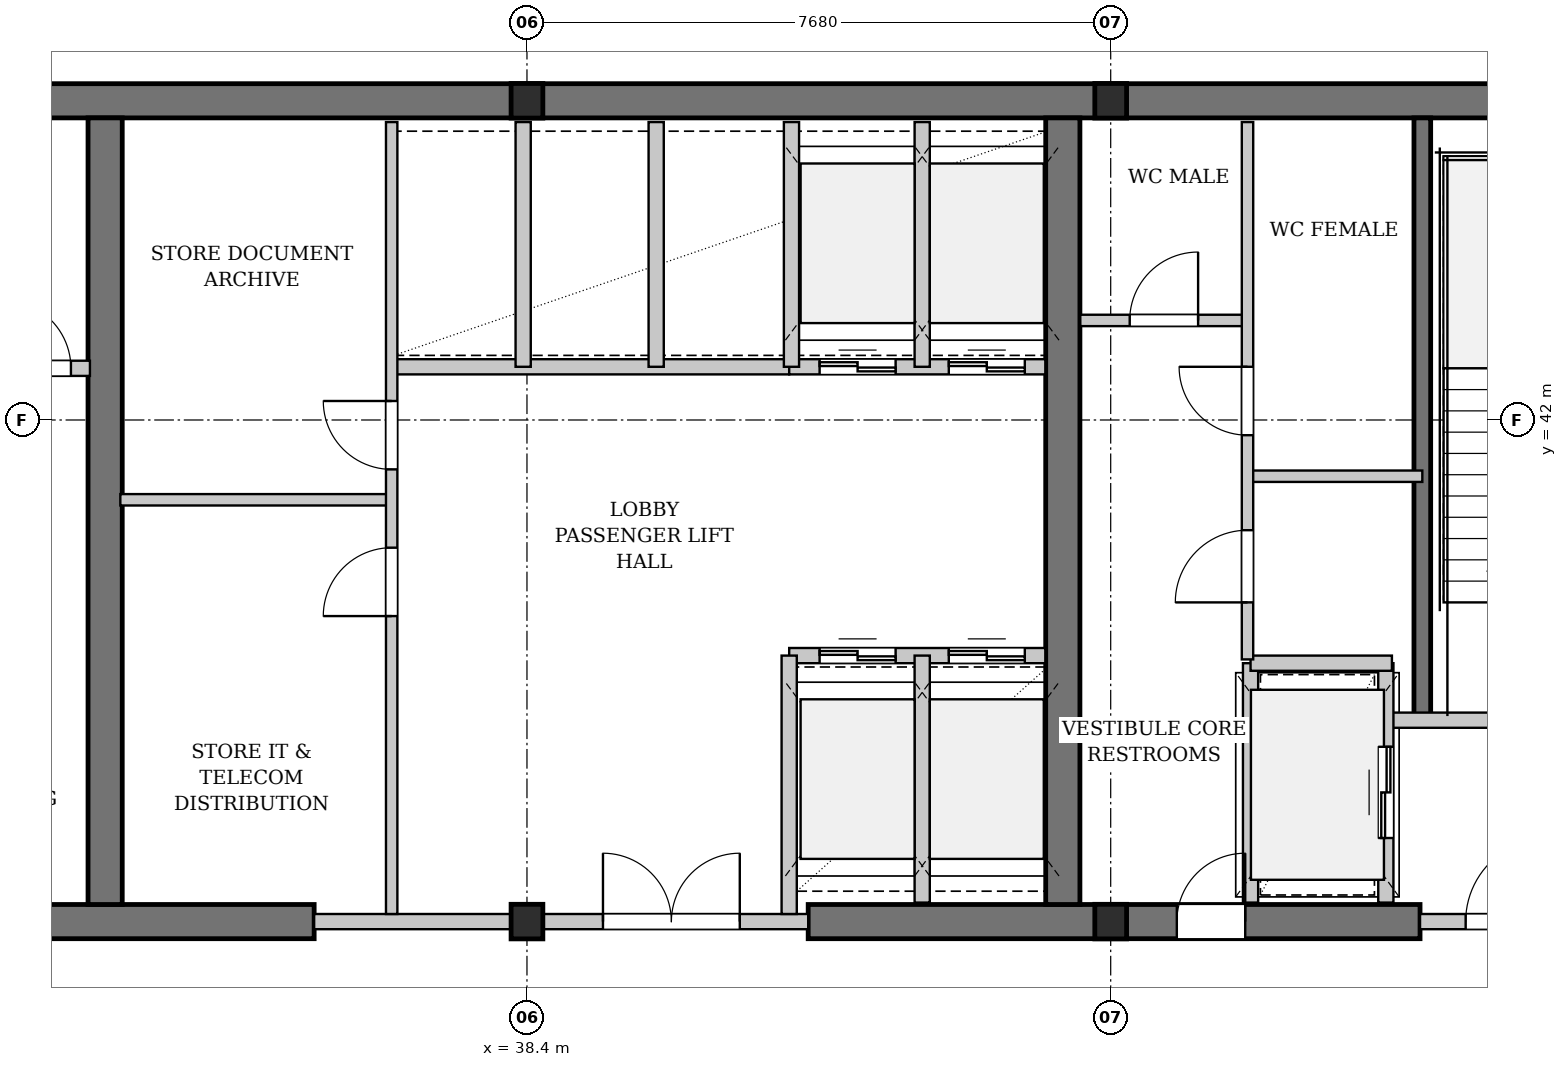
"""IFC4 building model, lengths in metres.
Left out: names, types, materials, properties, quantities, classifications, styles, units other than length and angle.
Written with IfcOpenShell. Run it as: python <this file> out.ifc"""

import sys

from ifc_helpers import new_model, si_unit, direction, frame, frame_2d, origin, origin_2d, place, context, subcontext, project, spatial, rectangle, i_section, extrude, element, fill, save


model = new_model("IFC4")
c1 = context("Model", 3, precision=1e-05, world=origin(), true_north=direction((0.0, 1.0)))
c2 = subcontext(c1, "Body", "Model", "MODEL_VIEW")
j1 = project(units=[si_unit("LENGTHUNIT", "METRE"), si_unit("PLANEANGLEUNIT", "RADIAN")], contexts=[c1])
p1 = place(None, origin())
s1 = spatial("IfcSite", under=j1, at=p1, CompositionType="ELEMENT")
p2 = place(p1, origin())
s2 = spatial("IfcBuilding", under=s1, at=p2, CompositionType="ELEMENT")
p3 = place(p2, frame((0.0, 0.0, 191.9)))
s3 = spatial("IfcBuildingStorey", under=s2, at=p3, CompositionType="ELEMENT", Elevation=191.9)
p4 = place(p3, frame((22.815, 46.2, 0.0), z_axis=(0.0, 0.0, 1.0), x_axis=(1.0, 0.0, 0.0)))
e1 = element("IfcWall", 1, at=p4, inside=s3, PredefinedType="SHEAR", context=c2, shape_type="SweptSolid", body=[
    extrude(rectangle(XDim=31.17, YDim=0.45, at=frame_2d((15.585, 0.0))), origin(), (0.0, 0.0, 1.0), 3.98),
])
p5 = place(p3, frame((30.72, 35.4, 0.0), z_axis=(0.0, 0.0, 1.0), x_axis=(1.0, 0.0, 0.0)))
e2 = element("IfcWall", 2, at=p5, inside=s3, PredefinedType="SHEAR", context=c2, shape_type="SweptSolid", body=[
    extrude(rectangle(XDim=4.88, YDim=0.45, at=frame_2d((2.44, 0.0))), origin(), (0.0, 0.0, 1.0), 3.98),
])
p6 = place(p3, frame((42.1, 35.4, 0.0), z_axis=(0.0, 0.0, 1.0), x_axis=(1.0, 0.0, 0.0)))
e3 = element("IfcWall", 3, at=p6, inside=s3, PredefinedType="SHEAR", context=c2, shape_type="SweptSolid", body=[
    extrude(rectangle(XDim=8.05, YDim=0.45, at=frame_2d((4.025, 0.0))), origin(), (0.0, 0.0, 1.0), 3.98),
])
p7 = place(p6, frame((4.85, 0.0, 0.0)))
e4 = element("IfcOpeningElement", 4, at=p7, cuts=e3, PredefinedType="OPENING", context=c2, shape_type="SweptSolid", body=[
    extrude(rectangle(XDim=0.9, YDim=2.15, at=frame_2d((0.45, 1.075))), frame((0.0, 0.235, 0.0), z_axis=(0.0, -1.0, 0.0), x_axis=(1.0, 0.0, 0.0)), (0.0, 0.0, 1.0), 0.47),
])
for number, where, z_axis, x_axis in (
    (5, (32.85, 35.625, 0.0), (0.0, 0.0, 1.0), (0.0, 1.0, 0.0)),
    (6, (45.45, 35.625, 0.0), (0.0, 0.0, 1.0), (0.0, 1.0, 0.0)),
):
    element("IfcWall", number, at=place(p3, frame(where, z_axis=z_axis, x_axis=x_axis)), inside=s3, PredefinedType="SHEAR", context=c2, shape_type="SweptSolid", body=[
        extrude(rectangle(XDim=10.35, YDim=0.45, at=frame_2d((5.175, 0.0))), origin(), (0.0, 0.0, 1.0), 3.98),
    ])
p8 = place(p3, frame((50.18, 38.05, 0.0), z_axis=(0.0, 0.0, 1.0), x_axis=(0.0, 1.0, 0.0)))
e7 = element("IfcWall", 7, at=p8, inside=s3, PredefinedType="SHEAR", context=c2, shape_type="SweptSolid", body=[
    extrude(rectangle(XDim=7.925, YDim=0.22, at=frame_2d((3.962, 0.0))), origin(), (0.0, 0.0, 1.0), 3.98),
])
for number, where, z_axis, x_axis in (
    (8, (38.4, 35.4, 0.0), (0.0, 0.0, 1.0), (1.0, 0.0, 0.0)),
    (9, (38.4, 46.2, 0.0), (0.0, 0.0, 1.0), (1.0, 0.0, 0.0)),
    (10, (46.08, 35.4, 0.0), (0.0, 0.0, 1.0), (1.0, 0.0, 0.0)),
    (11, (46.08, 46.2, 0.0), (0.0, 0.0, 1.0), (1.0, 0.0, 0.0)),
):
    element("IfcColumn", number, at=place(p3, frame(where, z_axis=z_axis, x_axis=x_axis)), inside=s3, PredefinedType="COLUMN", context=c2, shape_type="SweptSolid", body=[
        extrude(i_section(OverallWidth=0.418, OverallDepth=0.455, WebThickness=0.042, FlangeThickness=0.068, FilletRadius=0.015, at=origin_2d()), origin(), (0.0, 0.0, 1.0), 4.2),
    ])
p9 = place(p3, frame((27.32, 42.68, 0.0), z_axis=(0.0, 0.0, 1.0), x_axis=(1.0, 0.0, 0.0)))
e12 = element("IfcWall", 12, at=p9, inside=s3, PredefinedType="PARTITIONING", context=c2, shape_type="SweptSolid", body=[
    extrude(rectangle(XDim=5.33, YDim=0.2, at=frame_2d((2.665, 0.0))), origin(), (0.0, 0.0, 1.0), 3.98),
])
p10 = place(p9, frame((4.18, 0.0, 0.0)))
e13 = element("IfcOpeningElement", 13, at=p10, cuts=e12, PredefinedType="OPENING", context=c2, shape_type="SweptSolid", body=[
    extrude(rectangle(XDim=0.9, YDim=2.15, at=frame_2d((0.45, 1.075))), frame((0.0, 0.11, 0.0), z_axis=(0.0, -1.0, 0.0), x_axis=(1.0, 0.0, 0.0)), (0.0, 0.0, 1.0), 0.22),
])
p11 = place(p3, frame((35.6, 35.4, 0.0), z_axis=(0.0, 0.0, 1.0), x_axis=(1.0, 0.0, 0.0)))
e14 = element("IfcWall", 14, at=p11, inside=s3, PredefinedType="PARTITIONING", context=c2, shape_type="SweptSolid", body=[
    extrude(rectangle(XDim=6.5, YDim=0.2, at=frame_2d((3.25, 0.0))), origin(), (0.0, 0.0, 1.0), 3.161),
])
p12 = place(p11, frame((3.8, 0.0, 0.0)))
e15 = element("IfcOpeningElement", 15, at=p12, cuts=e14, PredefinedType="OPENING", context=c2, shape_type="SweptSolid", body=[
    extrude(rectangle(XDim=1.8, YDim=2.3, at=frame_2d((0.9, 1.15))), frame((0.0, 0.11, 0.0), z_axis=(0.0, -1.0, 0.0), x_axis=(1.0, 0.0, 0.0)), (0.0, 0.0, 1.0), 0.22),
])
p13 = place(p3, frame((36.6, 42.7, 0.0), z_axis=(0.0, 0.0, 1.0), x_axis=(1.0, 0.0, 0.0)))
e16 = element("IfcWall", 16, at=p13, inside=s3, PredefinedType="PARTITIONING", context=c2, shape_type="SweptSolid", body=[
    extrude(rectangle(XDim=5.25, YDim=0.2, at=frame_2d((2.625, 0.0))), origin(), (0.0, 0.0, 1.0), 3.98),
])
p14 = place(p3, frame((38.35, 42.7, 0.0), z_axis=(0.0, 0.0, 1.0), x_axis=(0.0, 1.0, 0.0)))
e17 = element("IfcWall", 17, at=p14, inside=s3, PredefinedType="PARTITIONING", context=c2, shape_type="SweptSolid", body=[
    extrude(rectangle(XDim=3.22, YDim=0.2, at=frame_2d((1.61, 0.0))), origin(), (0.0, 0.0, 1.0), 3.161),
])
p15 = place(p3, frame((40.1, 42.7, 0.0), z_axis=(0.0, 0.0, 1.0), x_axis=(0.0, 1.0, 0.0)))
e18 = element("IfcWall", 18, at=p15, inside=s3, PredefinedType="PARTITIONING", context=c2, shape_type="SweptSolid", body=[
    extrude(rectangle(XDim=3.22, YDim=0.2, at=frame_2d((1.61, 0.0))), origin(), (0.0, 0.0, 1.0), 3.98),
])
p16 = place(p3, frame((33.05, 40.95, 0.0), z_axis=(0.0, 0.0, 1.0), x_axis=(1.0, 0.0, 0.0)))
e19 = element("IfcWall", 19, at=p16, inside=s3, PredefinedType="PARTITIONING", context=c2, shape_type="SweptSolid", body=[
    extrude(rectangle(XDim=3.57, YDim=0.15, at=frame_2d((1.785, 0.0))), origin(), (0.0, 0.0, 1.0), 3.98),
])
p17 = place(p3, frame((36.62, 35.5, 0.0), z_axis=(0.0, 0.0, 1.0), x_axis=(0.0, 1.0, 0.0)))
e20 = element("IfcWall", 20, at=p17, inside=s3, PredefinedType="PARTITIONING", context=c2, shape_type="SweptSolid", body=[
    extrude(rectangle(XDim=10.42, YDim=0.15, at=frame_2d((5.21, 0.0))), origin(), (0.0, 0.0, 1.0), 3.98),
])
p18 = place(p17, frame((3.92, 0.0, 0.0)))
e21 = element("IfcOpeningElement", 21, at=p18, cuts=e20, PredefinedType="OPENING", context=c2, shape_type="SweptSolid", body=[
    extrude(rectangle(XDim=0.9, YDim=2.15, at=frame_2d((0.45, 1.075))), frame((0.0, 0.085, 0.0), z_axis=(0.0, -1.0, 0.0), x_axis=(1.0, 0.0, 0.0)), (0.0, 0.0, 1.0), 0.17),
])
p19 = place(p17, frame((5.85, 0.0, 0.0)))
e22 = element("IfcOpeningElement", 22, at=p19, cuts=e20, PredefinedType="OPENING", context=c2, shape_type="SweptSolid", body=[
    extrude(rectangle(XDim=0.9, YDim=2.15, at=frame_2d((0.45, 1.075))), frame((0.0, 0.085, 0.0), z_axis=(0.0, -1.0, 0.0), x_axis=(1.0, 0.0, 0.0)), (0.0, 0.0, 1.0), 0.17),
])
p20 = place(p3, frame((41.85, 38.9, 0.0), z_axis=(0.0, 0.0, 1.0), x_axis=(1.0, 0.0, 0.0)))
e23 = element("IfcWall", 23, at=p20, inside=s3, PredefinedType="PARTITIONING", context=c2, shape_type="SweptSolid", body=[
    extrude(rectangle(XDim=3.37, YDim=0.2, at=frame_2d((1.685, 0.0))), origin(), (0.0, 0.0, 1.0), 3.98),
])
p21 = place(p20, frame((0.4, 0.0, 0.0)))
e24 = element("IfcOpeningElement", 24, at=p21, cuts=e23, PredefinedType="OPENING", context=c2, shape_type="SweptSolid", body=[
    extrude(rectangle(XDim=1.0, YDim=2.2, at=frame_2d((0.5, 1.1))), frame((0.0, 0.11, 0.0), z_axis=(0.0, -1.0, 0.0), x_axis=(1.0, 0.0, 0.0)), (0.0, 0.0, 1.0), 0.22),
])
p22 = place(p20, frame((2.1, 0.0, 0.0)))
e25 = element("IfcOpeningElement", 25, at=p22, cuts=e23, PredefinedType="OPENING", context=c2, shape_type="SweptSolid", body=[
    extrude(rectangle(XDim=1.0, YDim=2.2, at=frame_2d((0.5, 1.1))), frame((0.0, 0.11, 0.0), z_axis=(0.0, -1.0, 0.0), x_axis=(1.0, 0.0, 0.0)), (0.0, 0.0, 1.0), 0.22),
])
p23 = place(p3, frame((41.85, 42.7, 0.0), z_axis=(0.0, 0.0, 1.0), x_axis=(1.0, 0.0, 0.0)))
e26 = element("IfcWall", 26, at=p23, inside=s3, PredefinedType="PARTITIONING", context=c2, shape_type="SweptSolid", body=[
    extrude(rectangle(XDim=3.37, YDim=0.2, at=frame_2d((1.685, 0.0))), origin(), (0.0, 0.0, 1.0), 3.98),
])
p24 = place(p23, frame((0.4, 0.0, 0.0)))
e27 = element("IfcOpeningElement", 27, at=p24, cuts=e26, PredefinedType="OPENING", context=c2, shape_type="SweptSolid", body=[
    extrude(rectangle(XDim=1.0, YDim=2.2, at=frame_2d((0.5, 1.1))), frame((0.0, 0.11, 0.0), z_axis=(0.0, -1.0, 0.0), x_axis=(1.0, 0.0, 0.0)), (0.0, 0.0, 1.0), 0.22),
])
p25 = place(p23, frame((2.1, 0.0, 0.0)))
e28 = element("IfcOpeningElement", 28, at=p25, cuts=e26, PredefinedType="OPENING", context=c2, shape_type="SweptSolid", body=[
    extrude(rectangle(XDim=1.0, YDim=2.2, at=frame_2d((0.5, 1.1))), frame((0.0, 0.11, 0.0), z_axis=(0.0, -1.0, 0.0), x_axis=(1.0, 0.0, 0.0)), (0.0, 0.0, 1.0), 0.22),
])
p26 = place(p3, frame((43.6, 35.65, 0.0), z_axis=(0.0, 0.0, 1.0), x_axis=(0.0, 1.0, 0.0)))
e29 = element("IfcWall", 29, at=p26, inside=s3, PredefinedType="PARTITIONING", context=c2, shape_type="SweptSolid", body=[
    extrude(rectangle(XDim=3.25, YDim=0.2, at=frame_2d((1.625, 0.0))), origin(), (0.0, 0.0, 1.0), 3.98),
])
p27 = place(p3, frame((43.6, 42.7, 0.0), z_axis=(0.0, 0.0, 1.0), x_axis=(0.0, 1.0, 0.0)))
e30 = element("IfcWall", 30, at=p27, inside=s3, PredefinedType="PARTITIONING", context=c2, shape_type="SweptSolid", body=[
    extrude(rectangle(XDim=3.22, YDim=0.2, at=frame_2d((1.61, 0.0))), origin(), (0.0, 0.0, 1.0), 3.98),
])
p28 = place(p3, frame((41.85, 35.5, 0.0), z_axis=(0.0, 0.0, 1.0), x_axis=(0.0, 1.0, 0.0)))
e31 = element("IfcWall", 31, at=p28, inside=s3, PredefinedType="PARTITIONING", context=c2, shape_type="SweptSolid", body=[
    extrude(rectangle(XDim=3.4, YDim=0.2, at=frame_2d((1.7, 0.0))), origin(), (0.0, 0.0, 1.0), 3.98),
])
p29 = place(p3, frame((41.88, 42.7, 0.0), z_axis=(0.0, 0.0, 1.0), x_axis=(0.0, 1.0, 0.0)))
e32 = element("IfcWall", 32, at=p29, inside=s3, PredefinedType="PARTITIONING", context=c2, shape_type="SweptSolid", body=[
    extrude(rectangle(XDim=3.22, YDim=0.2, at=frame_2d((1.61, 0.0))), origin(), (0.0, 0.0, 1.0), 3.98),
])
p30 = place(p3, frame((49.78, 38.05, 0.0), z_axis=(0.0, 0.0, 1.0), x_axis=(1.0, 0.0, 0.0)))
e33 = element("IfcWall", 33, at=p30, inside=s3, PredefinedType="PARTITIONING", context=c2, shape_type="SweptSolid", body=[
    extrude(rectangle(XDim=3.72, YDim=0.2, at=frame_2d((1.86, 0.0))), origin(), (0.0, 0.0, 1.0), 3.98),
])
p31 = place(p30, frame((1.436, 0.0, 0.0)))
e34 = element("IfcOpeningElement", 34, at=p31, cuts=e33, PredefinedType="OPENING", context=c2, shape_type="SweptSolid", body=[
    extrude(rectangle(XDim=1.1, YDim=2.15, at=frame_2d((0.55, 1.075))), frame((0.0, 0.11, 0.0), z_axis=(0.0, -1.0, 0.0), x_axis=(1.0, 0.0, 0.0)), (0.0, 0.0, 1.0), 0.22),
])
p32 = place(p3, frame((50.15, 35.4, 0.0), z_axis=(0.0, 0.0, 1.0), x_axis=(1.0, 0.0, 0.0)))
e35 = element("IfcWall", 35, at=p32, inside=s3, PredefinedType="PARTITIONING", context=c2, shape_type="SweptSolid", body=[
    extrude(rectangle(XDim=2.3, YDim=0.2, at=frame_2d((1.15, 0.0))), origin(), (0.0, 0.0, 1.0), 3.161),
])
p33 = place(p32, frame((0.6, 0.0, 0.0)))
e36 = element("IfcOpeningElement", 36, at=p33, cuts=e35, PredefinedType="OPENING", context=c2, shape_type="SweptSolid", body=[
    extrude(rectangle(XDim=1.1, YDim=2.15, at=frame_2d((0.55, 1.075))), frame((0.0, 0.11, 0.0), z_axis=(0.0, -1.0, 0.0), x_axis=(1.0, 0.0, 0.0)), (0.0, 0.0, 1.0), 0.22),
])
p34 = place(p3, frame((49.7, 35.65, 0.0), z_axis=(0.0, 0.0, 1.0), x_axis=(0.0, 1.0, 0.0)))
e37 = element("IfcWall", 37, at=p34, inside=s3, PredefinedType="PARTITIONING", context=c2, shape_type="SweptSolid", body=[
    extrude(rectangle(XDim=3.15, YDim=0.2, at=frame_2d((1.575, 0.0))), origin(), (0.0, 0.0, 1.0), 3.98),
])
p35 = place(p34, frame((0.85, 0.0, 0.0)))
e38 = element("IfcOpeningElement", 38, at=p35, cuts=e37, PredefinedType="OPENING", context=c2, shape_type="SweptSolid", body=[
    extrude(rectangle(XDim=1.2, YDim=2.2, at=frame_2d((0.6, 1.1))), frame((0.0, 0.11, 0.0), z_axis=(0.0, -1.0, 0.0), x_axis=(1.0, 0.0, 0.0)), (0.0, 0.0, 1.0), 0.22),
])
p36 = place(p3, frame((47.92, 35.65, 0.0), z_axis=(0.0, 0.0, 1.0), x_axis=(0.0, 1.0, 0.0)))
e39 = element("IfcWall", 39, at=p36, inside=s3, PredefinedType="PARTITIONING", context=c2, shape_type="SweptSolid", body=[
    extrude(rectangle(XDim=3.15, YDim=0.2, at=frame_2d((1.575, 0.0))), origin(), (0.0, 0.0, 1.0), 3.98),
])
p37 = place(p3, frame((47.92, 38.8, 0.0), z_axis=(0.0, 0.0, 1.0), x_axis=(1.0, 0.0, 0.0)))
e40 = element("IfcWall", 40, at=p37, inside=s3, PredefinedType="PARTITIONING", context=c2, shape_type="SweptSolid", body=[
    extrude(rectangle(XDim=1.86, YDim=0.2, at=frame_2d((0.93, 0.0))), origin(), (0.0, 0.0, 1.0), 3.98),
])
p38 = place(p3, frame((45.68, 43.31, 0.0), z_axis=(0.0, 0.0, 1.0), x_axis=(1.0, 0.0, 0.0)))
e41 = element("IfcWall", 41, at=p38, inside=s3, PredefinedType="PARTITIONING", context=c2, shape_type="SweptSolid", body=[
    extrude(rectangle(XDim=2.2, YDim=0.15, at=frame_2d((1.1, 0.0))), origin(), (0.0, 0.0, 1.0), 3.98),
])
p39 = place(p38, frame((0.65, 0.0, 0.0)))
e42 = element("IfcOpeningElement", 42, at=p39, cuts=e41, PredefinedType="OPENING", context=c2, shape_type="SweptSolid", body=[
    extrude(rectangle(XDim=0.9, YDim=2.15, at=frame_2d((0.45, 1.075))), frame((0.0, 0.085, 0.0), z_axis=(0.0, -1.0, 0.0), x_axis=(1.0, 0.0, 0.0)), (0.0, 0.0, 1.0), 0.17),
])
p40 = place(p3, frame((47.88, 41.26, 0.0), z_axis=(0.0, 0.0, 1.0), x_axis=(1.0, 0.0, 0.0)))
e43 = element("IfcWall", 43, at=p40, inside=s3, PredefinedType="PARTITIONING", context=c2, shape_type="SweptSolid", body=[
    extrude(rectangle(XDim=2.3, YDim=0.15, at=frame_2d((1.15, 0.0))), origin(), (0.0, 0.0, 1.0), 3.98),
])
p41 = place(p3, frame((47.88, 38.85, 0.0), z_axis=(0.0, 0.0, 1.0), x_axis=(0.0, 1.0, 0.0)))
e44 = element("IfcWall", 44, at=p41, inside=s3, PredefinedType="PARTITIONING", context=c2, shape_type="SweptSolid", body=[
    extrude(rectangle(XDim=7.07, YDim=0.15, at=frame_2d((3.535, 0.0))), origin(), (0.0, 0.0, 1.0), 3.98),
])
p42 = place(p41, frame((0.75, 0.0, 0.0)))
e45 = element("IfcOpeningElement", 45, at=p42, cuts=e44, PredefinedType="OPENING", context=c2, shape_type="SweptSolid", body=[
    extrude(rectangle(XDim=0.95, YDim=2.15, at=frame_2d((0.475, 1.075))), frame((0.0, 0.085, 0.0), z_axis=(0.0, -1.0, 0.0), x_axis=(1.0, 0.0, 0.0)), (0.0, 0.0, 1.0), 0.17),
])
p43 = place(p41, frame((2.95, 0.0, 0.0)))
e46 = element("IfcOpeningElement", 46, at=p43, cuts=e44, PredefinedType="OPENING", context=c2, shape_type="SweptSolid", body=[
    extrude(rectangle(XDim=0.9, YDim=2.15, at=frame_2d((0.45, 1.075))), frame((0.0, 0.085, 0.0), z_axis=(0.0, -1.0, 0.0), x_axis=(1.0, 0.0, 0.0)), (0.0, 0.0, 1.0), 0.17),
])
p44 = place(p10, origin())
e47 = element("IfcDoor", 47, at=p44, inside=s3, OperationType="SINGLE_SWING_LEFT", PredefinedType="DOOR", context=c2, shape_type="SweptSolid", body=[
    extrude(rectangle(XDim=0.9, YDim=2.15, at=frame_2d((0.45, 1.075))), frame((0.0, 0.025, 0.0), z_axis=(0.0, -1.0, 0.0), x_axis=(1.0, 0.0, 0.0)), (0.0, 0.0, 1.0), 0.05),
])
fill(e13, e47)
p45 = place(p12, origin())
e48 = element("IfcDoor", 48, at=p45, inside=s3, OperationType="DOUBLE_DOOR_SINGLE_SWING", PredefinedType="DOOR", context=c2, shape_type="SweptSolid", body=[
    extrude(rectangle(XDim=1.8, YDim=2.3, at=frame_2d((0.9, 1.15))), frame((0.0, 0.025, 0.0), z_axis=(0.0, -1.0, 0.0), x_axis=(1.0, 0.0, 0.0)), (0.0, 0.0, 1.0), 0.05),
])
fill(e15, e48)
p46 = place(p18, origin())
e49 = element("IfcDoor", 49, at=p46, inside=s3, OperationType="SINGLE_SWING_LEFT", PredefinedType="DOOR", context=c2, shape_type="SweptSolid", body=[
    extrude(rectangle(XDim=0.9, YDim=2.15, at=frame_2d((0.45, 1.075))), frame((0.0, 0.025, 0.0), z_axis=(0.0, -1.0, 0.0), x_axis=(1.0, 0.0, 0.0)), (0.0, 0.0, 1.0), 0.05),
])
fill(e21, e49)
p47 = place(p19, origin())
e50 = element("IfcDoor", 50, at=p47, inside=s3, OperationType="SINGLE_SWING_RIGHT", PredefinedType="DOOR", context=c2, shape_type="SweptSolid", body=[
    extrude(rectangle(XDim=0.9, YDim=2.15, at=frame_2d((0.45, 1.075))), frame((0.0, 0.025, 0.0), z_axis=(0.0, -1.0, 0.0), x_axis=(1.0, 0.0, 0.0)), (0.0, 0.0, 1.0), 0.05),
])
fill(e22, e50)
p48 = place(p21, origin())
e51 = element("IfcDoor", 51, at=p48, inside=s3, OperationType="DOUBLE_DOOR_SLIDING", PredefinedType="DOOR", context=c2, shape_type="SweptSolid", body=[
    extrude(rectangle(XDim=1.0, YDim=2.2, at=frame_2d((0.5, 1.1))), frame((0.0, 0.025, 0.0), z_axis=(0.0, -1.0, 0.0), x_axis=(1.0, 0.0, 0.0)), (0.0, 0.0, 1.0), 0.05),
])
fill(e24, e51)
p49 = place(p22, origin())
e52 = element("IfcDoor", 52, at=p49, inside=s3, OperationType="DOUBLE_DOOR_SLIDING", PredefinedType="DOOR", context=c2, shape_type="SweptSolid", body=[
    extrude(rectangle(XDim=1.0, YDim=2.2, at=frame_2d((0.5, 1.1))), frame((0.0, 0.025, 0.0), z_axis=(0.0, -1.0, 0.0), x_axis=(1.0, 0.0, 0.0)), (0.0, 0.0, 1.0), 0.05),
])
fill(e25, e52)
p50 = place(p24, origin())
e53 = element("IfcDoor", 53, at=p50, inside=s3, OperationType="DOUBLE_DOOR_SLIDING", PredefinedType="DOOR", context=c2, shape_type="SweptSolid", body=[
    extrude(rectangle(XDim=1.0, YDim=2.2, at=frame_2d((0.5, 1.1))), frame((0.0, 0.025, 0.0), z_axis=(0.0, -1.0, 0.0), x_axis=(1.0, 0.0, 0.0)), (0.0, 0.0, 1.0), 0.05),
])
fill(e27, e53)
p51 = place(p25, origin())
e54 = element("IfcDoor", 54, at=p51, inside=s3, OperationType="DOUBLE_DOOR_SLIDING", PredefinedType="DOOR", context=c2, shape_type="SweptSolid", body=[
    extrude(rectangle(XDim=1.0, YDim=2.2, at=frame_2d((0.5, 1.1))), frame((0.0, 0.025, 0.0), z_axis=(0.0, -1.0, 0.0), x_axis=(1.0, 0.0, 0.0)), (0.0, 0.0, 1.0), 0.05),
])
fill(e28, e54)
p52 = place(p33, origin())
e55 = element("IfcDoor", 55, at=p52, inside=s3, OperationType="SINGLE_SWING_RIGHT", PredefinedType="DOOR", context=c2, shape_type="SweptSolid", body=[
    extrude(rectangle(XDim=1.1, YDim=2.15, at=frame_2d((0.55, 1.075))), frame((0.0, 0.025, 0.0), z_axis=(0.0, -1.0, 0.0), x_axis=(1.0, 0.0, 0.0)), (0.0, 0.0, 1.0), 0.05),
])
fill(e36, e55)
p53 = place(p35, origin())
e56 = element("IfcDoor", 56, at=p53, inside=s3, OperationType="DOUBLE_DOOR_SLIDING", PredefinedType="DOOR", context=c2, shape_type="SweptSolid", body=[
    extrude(rectangle(XDim=1.2, YDim=2.2, at=frame_2d((0.6, 1.1))), frame((0.0, 0.025, 0.0), z_axis=(0.0, -1.0, 0.0), x_axis=(1.0, 0.0, 0.0)), (0.0, 0.0, 1.0), 0.05),
])
fill(e38, e56)
p54 = place(p39, origin())
e57 = element("IfcDoor", 57, at=p54, inside=s3, OperationType="SINGLE_SWING_RIGHT", PredefinedType="DOOR", context=c2, shape_type="SweptSolid", body=[
    extrude(rectangle(XDim=0.9, YDim=2.15, at=frame_2d((0.45, 1.075))), frame((0.0, 0.025, 0.0), z_axis=(0.0, -1.0, 0.0), x_axis=(1.0, 0.0, 0.0)), (0.0, 0.0, 1.0), 0.05),
])
fill(e42, e57)
p55 = place(p42, origin())
e58 = element("IfcDoor", 58, at=p55, inside=s3, OperationType="SINGLE_SWING_LEFT", PredefinedType="DOOR", context=c2, shape_type="SweptSolid", body=[
    extrude(rectangle(XDim=0.95, YDim=2.15, at=frame_2d((0.475, 1.075))), frame((0.0, 0.025, 0.0), z_axis=(0.0, -1.0, 0.0), x_axis=(1.0, 0.0, 0.0)), (0.0, 0.0, 1.0), 0.05),
])
fill(e45, e58)
p56 = place(p43, origin())
e59 = element("IfcDoor", 59, at=p56, inside=s3, OperationType="SINGLE_SWING_RIGHT", PredefinedType="DOOR", context=c2, shape_type="SweptSolid", body=[
    extrude(rectangle(XDim=0.9, YDim=2.15, at=frame_2d((0.45, 1.075))), frame((0.0, 0.025, 0.0), z_axis=(0.0, -1.0, 0.0), x_axis=(1.0, 0.0, 0.0)), (0.0, 0.0, 1.0), 0.05),
])
fill(e46, e59)
p57 = place(p7, origin())
e60 = element("IfcDoor", 60, at=p57, inside=s3, OperationType="SINGLE_SWING_RIGHT", PredefinedType="DOOR", context=c2, shape_type="SweptSolid", body=[
    extrude(rectangle(XDim=0.9, YDim=2.15, at=frame_2d((0.45, 1.075))), frame((0.0, 0.025, 0.0), z_axis=(0.0, -1.0, 0.0), x_axis=(1.0, 0.0, 0.0)), (0.0, 0.0, 1.0), 0.05),
])
fill(e4, e60)
save(model, sys.argv[1])
